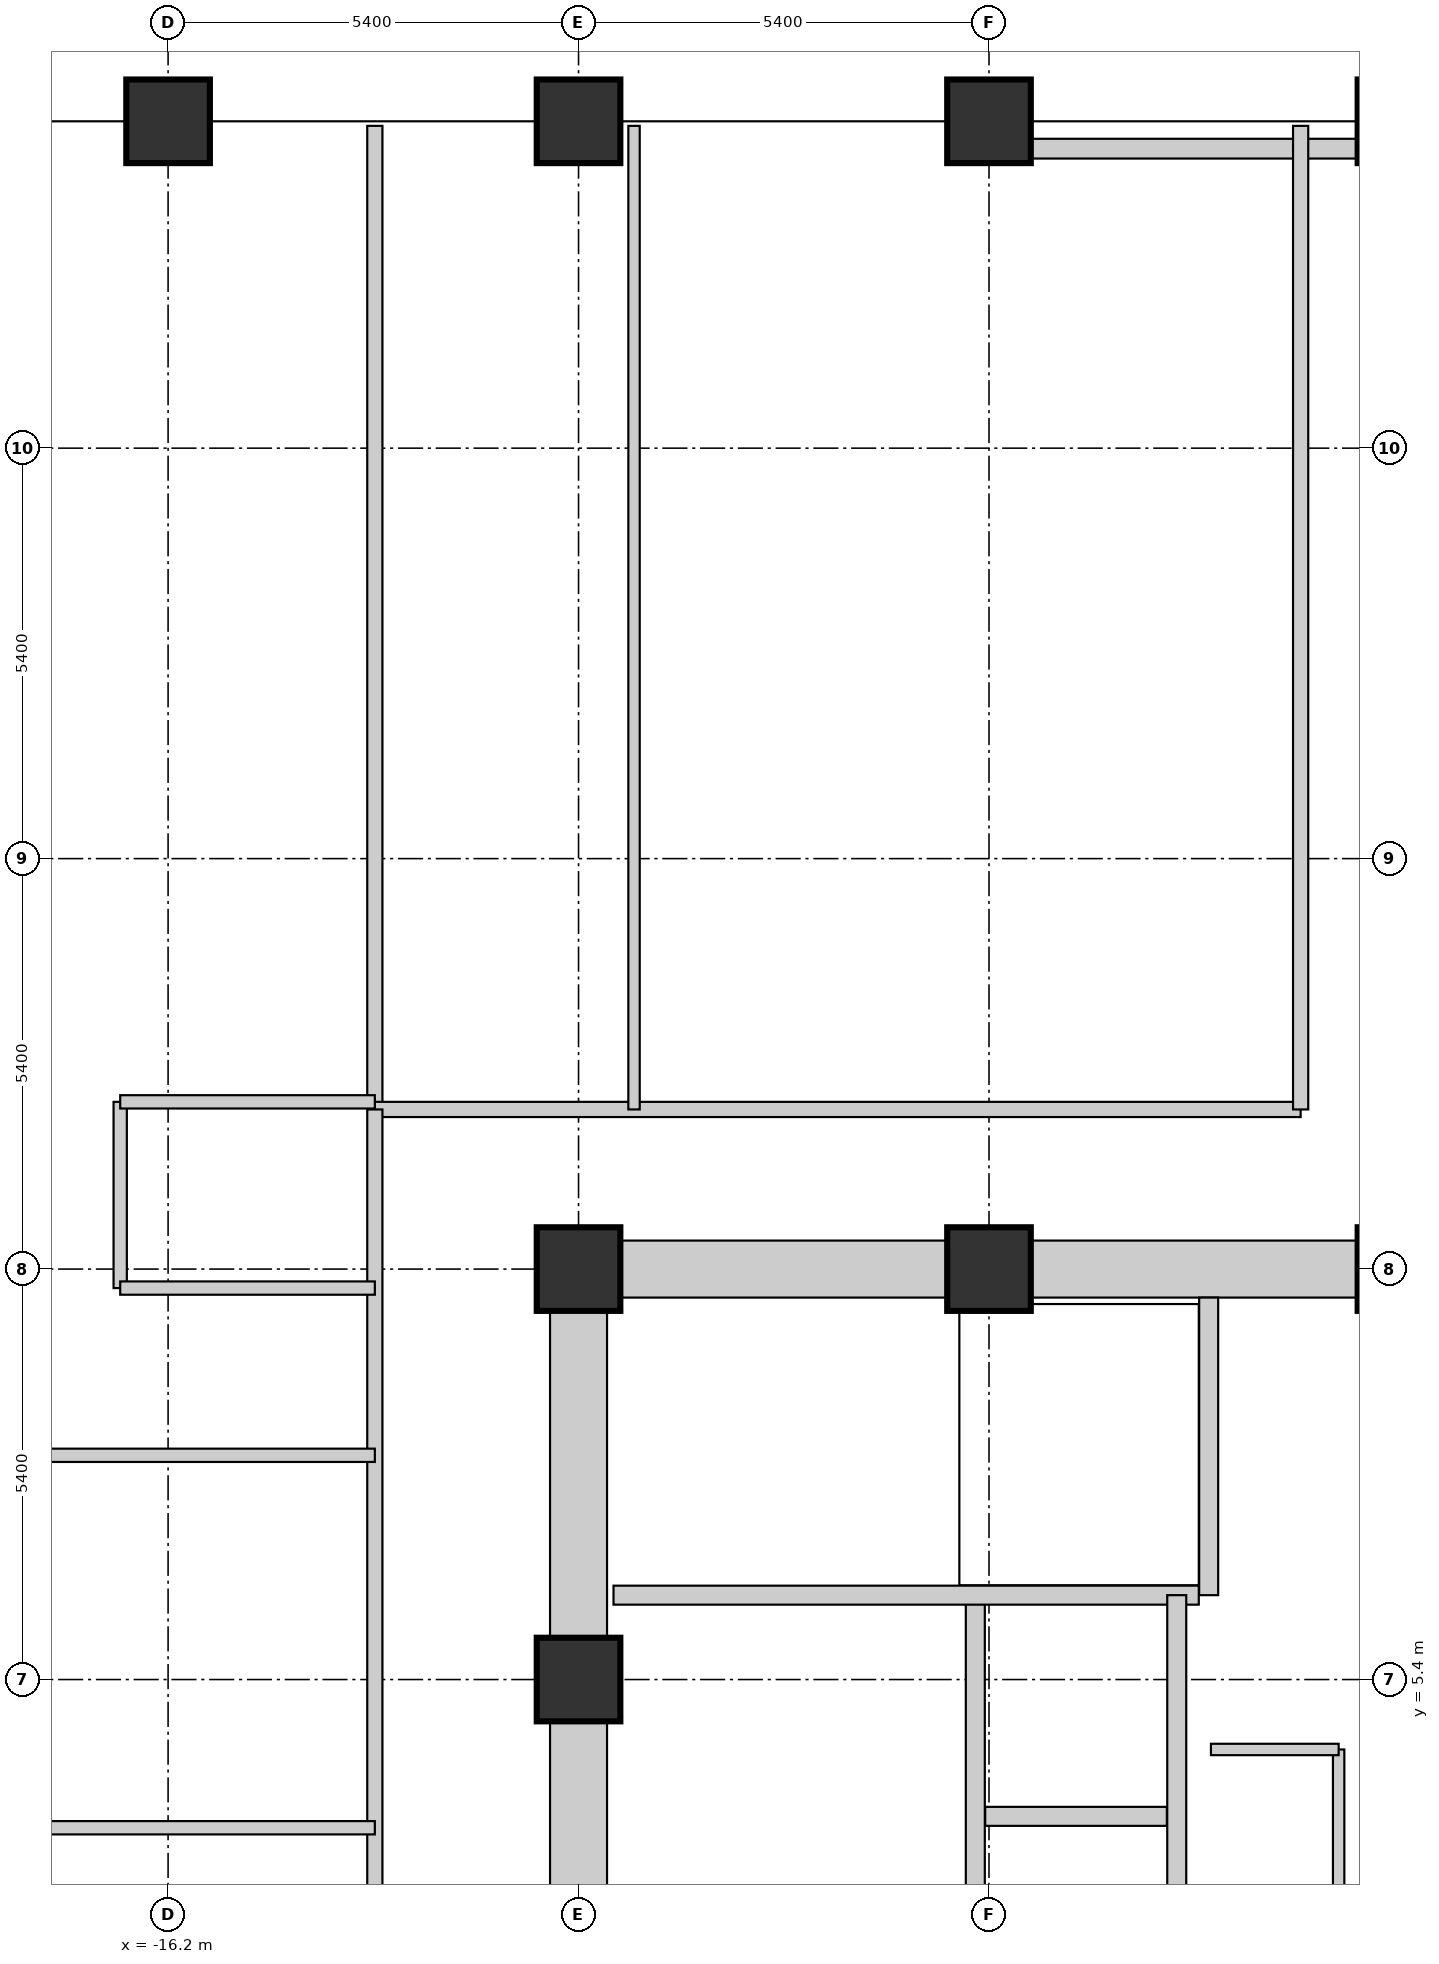
"""IFC4 building model, lengths in metres.
Left out: names, types, materials, properties, quantities, classifications, styles, units other than length and angle.
Written with IfcOpenShell. Run it as: python <this file> out.ifc"""

import sys

from ifc_helpers import new_model, si_unit, direction, frame, frame_2d, origin, origin_2d, place, context, subcontext, project, spatial, rectangle, extrude, element, fill, save


model = new_model("IFC4")
c1 = context("Model", 3, precision=1e-05, world=origin(), true_north=direction((0.0, 1.0)))
c2 = subcontext(c1, "Body", "Model", "MODEL_VIEW")
j1 = project(units=[si_unit("LENGTHUNIT", "METRE"), si_unit("PLANEANGLEUNIT", "RADIAN")], contexts=[c1])
p1 = place(None, origin())
s1 = spatial("IfcSite", under=j1, at=p1, CompositionType="ELEMENT")
p2 = place(p1, origin())
s2 = spatial("IfcBuilding", under=s1, at=p2, CompositionType="ELEMENT")
p3 = place(p2, frame((0.0, 0.0, 83.25)))
s3 = spatial("IfcBuildingStorey", under=s2, at=p3, CompositionType="ELEMENT", Elevation=83.25)
for number, where, z_axis, x_axis in (
    (1, (-16.2, 25.9, 0.0), (0.0, 0.0, 1.0), (1.0, 0.0, 0.0)),
    (2, (-10.8, 5.4, 0.0), (0.0, 0.0, 1.0), (1.0, 0.0, 0.0)),
    (3, (-10.8, 10.8, 0.0), (0.0, 0.0, 1.0), (1.0, 0.0, 0.0)),
    (4, (-10.8, 25.9, 0.0), (0.0, 0.0, 1.0), (1.0, 0.0, 0.0)),
    (5, (-5.4, 10.8, 0.0), (0.0, 0.0, 1.0), (1.0, 0.0, 0.0)),
    (6, (-5.4, 25.9, 0.0), (0.0, 0.0, 1.0), (1.0, 0.0, 0.0)),
    (7, (0.0, 10.8, 0.0), (0.0, 0.0, 1.0), (1.0, 0.0, 0.0)),
    (8, (0.0, 25.9, 0.0), (0.0, 0.0, 1.0), (1.0, 0.0, 0.0)),
):
    element("IfcColumn", number, at=place(p3, frame(where, z_axis=z_axis, x_axis=x_axis)), inside=s3, PredefinedType="COLUMN", context=c2, shape_type="SweptSolid", body=[
        extrude(rectangle(XDim=1.1, YDim=1.1, at=origin_2d()), origin(), (0.0, 0.0, 1.0), 3.75),
    ])
p4 = place(p3, frame((-10.24, 10.8, 0.0), z_axis=(0.0, 0.0, 1.0), x_axis=(1.0, 0.0, 0.0)))
e9 = element("IfcWall", 9, at=p4, inside=s3, PredefinedType="SHEAR", context=c2, shape_type="SweptSolid", body=[
    extrude(rectangle(XDim=4.28, YDim=0.75, at=frame_2d((2.14, 0.0))), origin(), (0.0, 0.0, 1.0), 3.75),
])
p5 = place(p3, frame((-4.84, 10.8, 0.0), z_axis=(0.0, 0.0, 1.0), x_axis=(1.0, 0.0, 0.0)))
e10 = element("IfcWall", 10, at=p5, inside=s3, PredefinedType="SHEAR", context=c2, shape_type="SweptSolid", body=[
    extrude(rectangle(XDim=4.28, YDim=0.75, at=frame_2d((2.14, 0.0))), origin(), (0.0, 0.0, 1.0), 3.75),
])
p6 = place(p5, frame((2.93, 0.0, 0.0)))
e11 = element("IfcOpeningElement", 11, at=p6, cuts=e10, PredefinedType="OPENING", context=c2, shape_type="SweptSolid", body=[
    extrude(rectangle(XDim=1.1, YDim=2.1, at=frame_2d((0.55, 1.05))), frame((0.0, 0.385, 0.0), z_axis=(0.0, -1.0, 0.0), x_axis=(1.0, 0.0, 0.0)), (0.0, 0.0, 1.0), 0.77),
])
p7 = place(p3, frame((-10.8, 0.56, 0.0), z_axis=(0.0, 0.0, 1.0), x_axis=(0.0, 1.0, 0.0)))
e12 = element("IfcWall", 12, at=p7, inside=s3, PredefinedType="SHEAR", context=c2, shape_type="SweptSolid", body=[
    extrude(rectangle(XDim=4.28, YDim=0.75, at=frame_2d((2.14, 0.0))), origin(), (0.0, 0.0, 1.0), 3.75),
])
p8 = place(p7, frame((1.59, 0.0, 0.0)))
e13 = element("IfcOpeningElement", 13, at=p8, cuts=e12, PredefinedType="OPENING", context=c2, shape_type="SweptSolid", body=[
    extrude(rectangle(XDim=1.1, YDim=2.1, at=frame_2d((0.55, 1.05))), frame((0.0, 0.385, 0.0), z_axis=(0.0, -1.0, 0.0), x_axis=(1.0, 0.0, 0.0)), (0.0, 0.0, 1.0), 0.77),
])
p9 = place(p3, frame((-10.8, 5.96, 0.0), z_axis=(0.0, 0.0, 1.0), x_axis=(0.0, 1.0, 0.0)))
e14 = element("IfcWall", 14, at=p9, inside=s3, PredefinedType="SHEAR", context=c2, shape_type="SweptSolid", body=[
    extrude(rectangle(XDim=4.28, YDim=0.75, at=frame_2d((2.14, 0.0))), origin(), (0.0, 0.0, 1.0), 3.75),
])
p10 = place(p3, frame((-0.548, 25.54, 0.0), z_axis=(0.0, 0.0, 1.0), x_axis=(-1.0, 0.0, 0.0)))
e15 = element("IfcWall", 15, at=p10, inside=s3, PredefinedType="STANDARD", context=c2, shape_type="SweptSolid", body=[
    extrude(rectangle(XDim=4.304, YDim=0.26, at=frame_2d((2.152, 0.0))), origin(), (0.0, 0.0, 1.0), 2.699),
])
p11 = place(p3, frame((-5.58, 0.72, 0.0), z_axis=(0.0, 0.0, 1.0), x_axis=(0.0, 1.0, 0.0)))
e16 = element("IfcWall", 16, at=p11, inside=s3, PredefinedType="SHEAR", context=c2, shape_type="SweptSolid", body=[
    extrude(rectangle(XDim=5.79, YDim=0.25, at=frame_2d((2.895, 0.0))), origin(), (0.0, 0.0, 1.0), 3.75),
])
p12 = place(p11, frame((3.35, 0.0, 0.0)))
e17 = element("IfcOpeningElement", 17, at=p12, cuts=e16, PredefinedType="OPENING", context=c2, shape_type="SweptSolid", body=[
    extrude(rectangle(XDim=1.1, YDim=2.1, at=frame_2d((0.55, 1.05))), frame((0.0, 0.135, 0.0), z_axis=(0.0, -1.0, 0.0), x_axis=(1.0, 0.0, 0.0)), (0.0, 0.0, 1.0), 0.27),
])
p13 = place(p3, frame((-2.51, 6.51, 0.0), z_axis=(0.0, 0.0, 1.0), x_axis=(0.0, 1.0, 0.0)))
e18 = element("IfcWall", 18, at=p13, inside=s3, PredefinedType="SHEAR", context=c2, shape_type="SweptSolid", body=[
    extrude(rectangle(XDim=3.915, YDim=0.25, at=frame_2d((1.958, 0.0))), origin(), (0.0, 0.0, 1.0), 3.75),
])
p14 = place(p3, frame((-10.34, 6.51, 0.0), z_axis=(0.0, 0.0, 1.0), x_axis=(1.0, 0.0, 0.0)))
e19 = element("IfcWall", 19, at=p14, inside=s3, PredefinedType="SHEAR", context=c2, shape_type="SweptSolid", body=[
    extrude(rectangle(XDim=7.7, YDim=0.25, at=frame_2d((3.85, 0.0))), origin(), (0.0, 0.0, 1.0), 3.75),
])
p15 = place(p14, frame((0.35, 0.0, 0.0)))
e20 = element("IfcOpeningElement", 20, at=p15, cuts=e19, PredefinedType="OPENING", context=c2, shape_type="SweptSolid", body=[
    extrude(rectangle(XDim=1.1, YDim=2.1, at=frame_2d((0.55, 1.05))), frame((0.0, 0.135, 0.0), z_axis=(0.0, -1.0, 0.0), x_axis=(1.0, 0.0, 0.0)), (0.0, 0.0, 1.0), 0.27),
])
p16 = place(p3, frame((-2.93, 0.68, 0.0), z_axis=(0.0, 0.0, 1.0), x_axis=(0.0, 1.0, 0.0)))
e21 = element("IfcWall", 21, at=p16, inside=s3, PredefinedType="SHEAR", context=c2, shape_type="SweptSolid", body=[
    extrude(rectangle(XDim=5.83, YDim=0.25, at=frame_2d((2.915, 0.0))), origin(), (0.0, 0.0, 1.0), 3.75),
])
p17 = place(p16, frame((0.75, 0.0, 0.0)))
e22 = element("IfcOpeningElement", 22, at=p17, cuts=e21, PredefinedType="OPENING", context=c2, shape_type="SweptSolid", body=[
    extrude(rectangle(XDim=1.2, YDim=2.1, at=frame_2d((0.6, 1.05))), frame((0.0, 0.135, 0.0), z_axis=(0.0, -1.0, 0.0), x_axis=(1.0, 0.0, 0.0)), (0.0, 0.0, 1.0), 0.27),
])
p18 = place(p3, frame((-5.45, 3.6, 0.0), z_axis=(0.0, 0.0, 1.0), x_axis=(1.0, 0.0, 0.0)))
e23 = element("IfcWall", 23, at=p18, inside=s3, PredefinedType="SHEAR", context=c2, shape_type="SweptSolid", body=[
    extrude(rectangle(XDim=2.39, YDim=0.25, at=frame_2d((1.195, 0.0))), origin(), (0.0, 0.0, 1.0), 3.75),
])
p19 = place(p3, frame((-13.48, 12.9, 0.0), z_axis=(0.0, 0.0, 1.0), x_axis=(0.0, 1.0, 0.0)))
e24 = element("IfcWall", 24, at=p19, inside=s3, PredefinedType="PARTITIONING", context=c2, shape_type="SweptSolid", body=[
    extrude(rectangle(XDim=12.94, YDim=0.2, at=frame_2d((6.47, 0.0))), origin(), (0.0, 0.0, 1.0), 2.699),
])
p20 = place(p3, frame((-13.48, 12.9, 0.0), z_axis=(0.0, 0.0, 1.0), x_axis=(1.0, 0.0, 0.0)))
e25 = element("IfcWall", 25, at=p20, inside=s3, PredefinedType="PARTITIONING", context=c2, shape_type="SweptSolid", body=[
    extrude(rectangle(XDim=12.18, YDim=0.2, at=frame_2d((6.09, 0.0))), origin(), (0.0, 0.0, 1.0), 2.933),
])
p21 = place(p20, frame((1.255, 0.0, 0.0)))
e26 = element("IfcOpeningElement", 26, at=p21, cuts=e25, PredefinedType="OPENING", context=c2, shape_type="SweptSolid", body=[
    extrude(rectangle(XDim=0.85, YDim=2.1, at=frame_2d((0.425, 1.05))), frame((0.0, 0.11, 0.0), z_axis=(0.0, -1.0, 0.0), x_axis=(1.0, 0.0, 0.0)), (0.0, 0.0, 1.0), 0.22),
])
p22 = place(p20, frame((4.9, 0.0, 0.0)))
e27 = element("IfcOpeningElement", 27, at=p22, cuts=e25, PredefinedType="OPENING", context=c2, shape_type="SweptSolid", body=[
    extrude(rectangle(XDim=0.95, YDim=2.1, at=frame_2d((0.475, 1.05))), frame((0.0, 0.11, 0.0), z_axis=(0.0, -1.0, 0.0), x_axis=(1.0, 0.0, 0.0)), (0.0, 0.0, 1.0), 0.22),
])
p23 = place(p3, frame((-1.3, 12.9, 0.0), z_axis=(0.0, 0.0, 1.0), x_axis=(0.0, 1.0, 0.0)))
e28 = element("IfcWall", 28, at=p23, inside=s3, PredefinedType="PARTITIONING", context=c2, shape_type="SweptSolid", body=[
    extrude(rectangle(XDim=12.94, YDim=0.2, at=frame_2d((6.47, 0.0))), origin(), (0.0, 0.0, 1.0), 2.699),
])
p24 = place(p3, frame((-13.48, -12.9, 0.0), z_axis=(0.0, 0.0, 1.0), x_axis=(0.0, 1.0, 0.0)))
e29 = element("IfcWall", 29, at=p24, inside=s3, PredefinedType="PARTITIONING", context=c2, shape_type="SweptSolid", body=[
    extrude(rectangle(XDim=25.8, YDim=0.2, at=frame_2d((12.9, 0.0))), origin(), (0.0, 0.0, 1.0), 3.57),
])
p25 = place(p24, frame((1.07, 0.0, 0.0)))
e30 = element("IfcOpeningElement", 30, at=p25, cuts=e29, PredefinedType="OPENING", context=c2, shape_type="SweptSolid", body=[
    extrude(rectangle(XDim=0.95, YDim=2.1, at=frame_2d((0.475, 1.05))), frame((0.0, 0.11, 0.0), z_axis=(0.0, -1.0, 0.0), x_axis=(1.0, 0.0, 0.0)), (0.0, 0.0, 1.0), 0.22),
])
p26 = place(p24, frame((24.205, 0.0, 0.0)))
e31 = element("IfcOpeningElement", 31, at=p26, cuts=e29, PredefinedType="OPENING", context=c2, shape_type="SweptSolid", body=[
    extrude(rectangle(XDim=0.85, YDim=2.1, at=frame_2d((0.425, 1.05))), frame((0.0, 0.11, 0.0), z_axis=(0.0, -1.0, 0.0), x_axis=(1.0, 0.0, 0.0)), (0.0, 0.0, 1.0), 0.22),
])
p27 = place(p24, frame((21.87, 0.0, 0.0)))
e32 = element("IfcOpeningElement", 32, at=p27, cuts=e29, PredefinedType="OPENING", context=c2, shape_type="SweptSolid", body=[
    extrude(rectangle(XDim=0.95, YDim=2.1, at=frame_2d((0.475, 1.05))), frame((0.0, 0.11, 0.0), z_axis=(0.0, -1.0, 0.0), x_axis=(1.0, 0.0, 0.0)), (0.0, 0.0, 1.0), 0.22),
])
p28 = place(p24, frame((4.525, 0.0, 0.0)))
e33 = element("IfcOpeningElement", 33, at=p28, cuts=e29, PredefinedType="OPENING", context=c2, shape_type="SweptSolid", body=[
    extrude(rectangle(XDim=0.95, YDim=2.1, at=frame_2d((0.475, 1.05))), frame((0.0, 0.11, 0.0), z_axis=(0.0, -1.0, 0.0), x_axis=(1.0, 0.0, 0.0)), (0.0, 0.0, 1.0), 0.22),
])
p29 = place(p24, frame((8.7, 0.0, 0.0)))
e34 = element("IfcOpeningElement", 34, at=p29, cuts=e29, PredefinedType="OPENING", context=c2, shape_type="SweptSolid", body=[
    extrude(rectangle(XDim=0.95, YDim=2.1, at=frame_2d((0.475, 1.05))), frame((0.0, 0.11, 0.0), z_axis=(0.0, -1.0, 0.0), x_axis=(1.0, 0.0, 0.0)), (0.0, 0.0, 1.0), 0.22),
])
p30 = place(p24, frame((13.42, 0.0, 0.0)))
e35 = element("IfcOpeningElement", 35, at=p30, cuts=e29, PredefinedType="OPENING", context=c2, shape_type="SweptSolid", body=[
    extrude(rectangle(XDim=0.95, YDim=2.1, at=frame_2d((0.475, 1.05))), frame((0.0, 0.11, 0.0), z_axis=(0.0, -1.0, 0.0), x_axis=(1.0, 0.0, 0.0)), (0.0, 0.0, 1.0), 0.22),
])
p31 = place(p24, frame((18.32, 0.0, 0.0)))
e36 = element("IfcOpeningElement", 36, at=p31, cuts=e29, PredefinedType="OPENING", context=c2, shape_type="SweptSolid", body=[
    extrude(rectangle(XDim=0.95, YDim=2.1, at=frame_2d((0.475, 1.05))), frame((0.0, 0.11, 0.0), z_axis=(0.0, -1.0, 0.0), x_axis=(1.0, 0.0, 0.0)), (0.0, 0.0, 1.0), 0.22),
])
p32 = place(p3, frame((-0.8, 1.52, 0.0), z_axis=(0.0, 0.0, 1.0), x_axis=(0.0, 1.0, 0.0)))
e37 = element("IfcWall", 37, at=p32, inside=s3, PredefinedType="PARTITIONING", context=c2, shape_type="SweptSolid", body=[
    extrude(rectangle(XDim=2.96, YDim=0.15, at=frame_2d((1.48, 0.0))), origin(), (0.0, 0.0, 1.0), 3.57),
])
p33 = place(p32, frame((0.95, 0.0, 0.0)))
e38 = element("IfcOpeningElement", 38, at=p33, cuts=e37, PredefinedType="OPENING", context=c2, shape_type="SweptSolid", body=[
    extrude(rectangle(XDim=0.85, YDim=2.1, at=frame_2d((0.425, 1.05))), frame((0.0, 0.085, 0.0), z_axis=(0.0, -1.0, 0.0), x_axis=(1.0, 0.0, 0.0)), (0.0, 0.0, 1.0), 0.17),
])
p34 = place(p3, frame((-2.48, 4.48, 0.0), z_axis=(0.0, 0.0, 1.0), x_axis=(1.0, 0.0, 0.0)))
e39 = element("IfcWall", 39, at=p34, inside=s3, PredefinedType="PARTITIONING", context=c2, shape_type="SweptSolid", body=[
    extrude(rectangle(XDim=1.68, YDim=0.15, at=frame_2d((0.84, 0.0))), origin(), (0.0, 0.0, 1.0), 3.57),
])
p35 = place(p3, frame((-10.07, 12.9, 0.0), z_axis=(0.0, 0.0, 1.0), x_axis=(0.0, 1.0, 0.0)))
e40 = element("IfcWall", 40, at=p35, inside=s3, PredefinedType="PARTITIONING", context=c2, shape_type="SweptSolid", body=[
    extrude(rectangle(XDim=12.94, YDim=0.15, at=frame_2d((6.47, 0.0))), origin(), (0.0, 0.0, 1.0), 2.699),
])
p36 = place(p3, frame((-32.34, 3.45, 0.0), z_axis=(0.0, 0.0, 1.0), x_axis=(1.0, 0.0, 0.0)))
e41 = element("IfcWall", 41, at=p36, inside=s3, PredefinedType="PARTITIONING", context=c2, shape_type="SweptSolid", body=[
    extrude(rectangle(XDim=18.86, YDim=0.175, at=frame_2d((9.43, 0.0))), origin(), (0.0, 0.0, 1.0), 2.699),
])
p37 = place(p3, frame((-16.83, 10.55, 0.0), z_axis=(0.0, 0.0, 1.0), x_axis=(0.0, 1.0, 0.0)))
e42 = element("IfcWall", 42, at=p37, inside=s3, PredefinedType="PARTITIONING", context=c2, shape_type="SweptSolid", body=[
    extrude(rectangle(XDim=2.45, YDim=0.175, at=frame_2d((1.225, 0.0))), origin(), (0.0, 0.0, 1.0), 3.57),
])
for number, where, z_axis, x_axis in (
    (43, (-16.83, 13.0, 0.0), (0.0, 0.0, 1.0), (1.0, 0.0, 0.0)),
    (44, (-16.83, 10.55, 0.0), (0.0, 0.0, 1.0), (1.0, 0.0, 0.0)),
):
    element("IfcWall", number, at=place(p3, frame(where, z_axis=z_axis, x_axis=x_axis)), inside=s3, PredefinedType="PARTITIONING", context=c2, shape_type="SweptSolid", body=[
        extrude(rectangle(XDim=3.35, YDim=0.175, at=frame_2d((1.675, 0.0))), origin(), (0.0, 0.0, 1.0), 3.57),
    ])
p38 = place(p3, frame((-32.34, 8.35, 0.0), z_axis=(0.0, 0.0, 1.0), x_axis=(1.0, 0.0, 0.0)))
e45 = element("IfcWall", 45, at=p38, inside=s3, PredefinedType="PARTITIONING", context=c2, shape_type="SweptSolid", body=[
    extrude(rectangle(XDim=18.86, YDim=0.175, at=frame_2d((9.43, 0.0))), origin(), (0.0, 0.0, 1.0), 2.699),
])
p39 = place(p33, origin())
e46 = element("IfcDoor", 46, at=p39, inside=s3, OperationType="SINGLE_SWING_LEFT", PredefinedType="DOOR", context=c2, shape_type="SweptSolid", body=[
    extrude(rectangle(XDim=0.85, YDim=2.1, at=frame_2d((0.425, 1.05))), frame((0.0, 0.025, 0.0), z_axis=(0.0, -1.0, 0.0), x_axis=(1.0, 0.0, 0.0)), (0.0, 0.0, 1.0), 0.05),
])
fill(e38, e46)
p40 = place(p15, origin())
e47 = element("IfcDoor", 47, at=p40, inside=s3, OperationType="SINGLE_SWING_LEFT", PredefinedType="DOOR", context=c2, shape_type="SweptSolid", body=[
    extrude(rectangle(XDim=1.1, YDim=2.1, at=frame_2d((0.55, 1.05))), frame((0.0, 0.025, 0.0), z_axis=(0.0, -1.0, 0.0), x_axis=(1.0, 0.0, 0.0)), (0.0, 0.0, 1.0), 0.05),
])
fill(e20, e47)
p41 = place(p6, origin())
e48 = element("IfcDoor", 48, at=p41, inside=s3, OperationType="SINGLE_SWING_LEFT", PredefinedType="DOOR", context=c2, shape_type="SweptSolid", body=[
    extrude(rectangle(XDim=1.1, YDim=2.1, at=frame_2d((0.55, 1.05))), frame((0.0, 0.025, 0.0), z_axis=(0.0, -1.0, 0.0), x_axis=(1.0, 0.0, 0.0)), (0.0, 0.0, 1.0), 0.05),
])
fill(e11, e48)
p42 = place(p8, origin())
e49 = element("IfcDoor", 49, at=p42, inside=s3, OperationType="SINGLE_SWING_LEFT", PredefinedType="DOOR", context=c2, shape_type="SweptSolid", body=[
    extrude(rectangle(XDim=1.1, YDim=2.1, at=frame_2d((0.55, 1.05))), frame((0.0, 0.025, 0.0), z_axis=(0.0, -1.0, 0.0), x_axis=(1.0, 0.0, 0.0)), (0.0, 0.0, 1.0), 0.05),
])
fill(e13, e49)
p43 = place(p12, origin())
e50 = element("IfcDoor", 50, at=p43, inside=s3, OperationType="SLIDING_TO_LEFT", PredefinedType="DOOR", context=c2, shape_type="SweptSolid", body=[
    extrude(rectangle(XDim=1.1, YDim=2.1, at=frame_2d((0.55, 1.05))), frame((0.0, 0.025, 0.0), z_axis=(0.0, -1.0, 0.0), x_axis=(1.0, 0.0, 0.0)), (0.0, 0.0, 1.0), 0.05),
])
fill(e17, e50)
p44 = place(p26, origin())
e51 = element("IfcDoor", 51, at=p44, inside=s3, OperationType="SINGLE_SWING_LEFT", PredefinedType="DOOR", context=c2, shape_type="SweptSolid", body=[
    extrude(rectangle(XDim=0.85, YDim=2.1, at=frame_2d((0.425, 1.05))), frame((0.0, 0.025, 0.0), z_axis=(0.0, -1.0, 0.0), x_axis=(1.0, 0.0, 0.0)), (0.0, 0.0, 1.0), 0.05),
])
fill(e31, e51)
p45 = place(p27, origin())
e52 = element("IfcDoor", 52, at=p45, inside=s3, OperationType="SINGLE_SWING_RIGHT", PredefinedType="DOOR", context=c2, shape_type="SweptSolid", body=[
    extrude(rectangle(XDim=0.95, YDim=2.1, at=frame_2d((0.475, 1.05))), frame((0.0, 0.025, 0.0), z_axis=(0.0, -1.0, 0.0), x_axis=(1.0, 0.0, 0.0)), (0.0, 0.0, 1.0), 0.05),
])
fill(e32, e52)
p46 = place(p31, origin())
e53 = element("IfcDoor", 53, at=p46, inside=s3, OperationType="SINGLE_SWING_RIGHT", PredefinedType="DOOR", context=c2, shape_type="SweptSolid", body=[
    extrude(rectangle(XDim=0.95, YDim=2.1, at=frame_2d((0.475, 1.05))), frame((0.0, 0.025, 0.0), z_axis=(0.0, -1.0, 0.0), x_axis=(1.0, 0.0, 0.0)), (0.0, 0.0, 1.0), 0.05),
])
fill(e36, e53)
p47 = place(p21, origin())
e54 = element("IfcDoor", 54, at=p47, inside=s3, OperationType="SINGLE_SWING_LEFT", PredefinedType="DOOR", context=c2, shape_type="SweptSolid", body=[
    extrude(rectangle(XDim=0.85, YDim=2.1, at=frame_2d((0.425, 1.05))), frame((0.0, 0.025, 0.0), z_axis=(0.0, -1.0, 0.0), x_axis=(1.0, 0.0, 0.0)), (0.0, 0.0, 1.0), 0.05),
])
fill(e26, e54)
p48 = place(p22, origin())
e55 = element("IfcDoor", 55, at=p48, inside=s3, OperationType="SINGLE_SWING_RIGHT", PredefinedType="DOOR", context=c2, shape_type="SweptSolid", body=[
    extrude(rectangle(XDim=0.95, YDim=2.1, at=frame_2d((0.475, 1.05))), frame((0.0, 0.025, 0.0), z_axis=(0.0, -1.0, 0.0), x_axis=(1.0, 0.0, 0.0)), (0.0, 0.0, 1.0), 0.05),
])
fill(e27, e55)
save(model, sys.argv[1])
